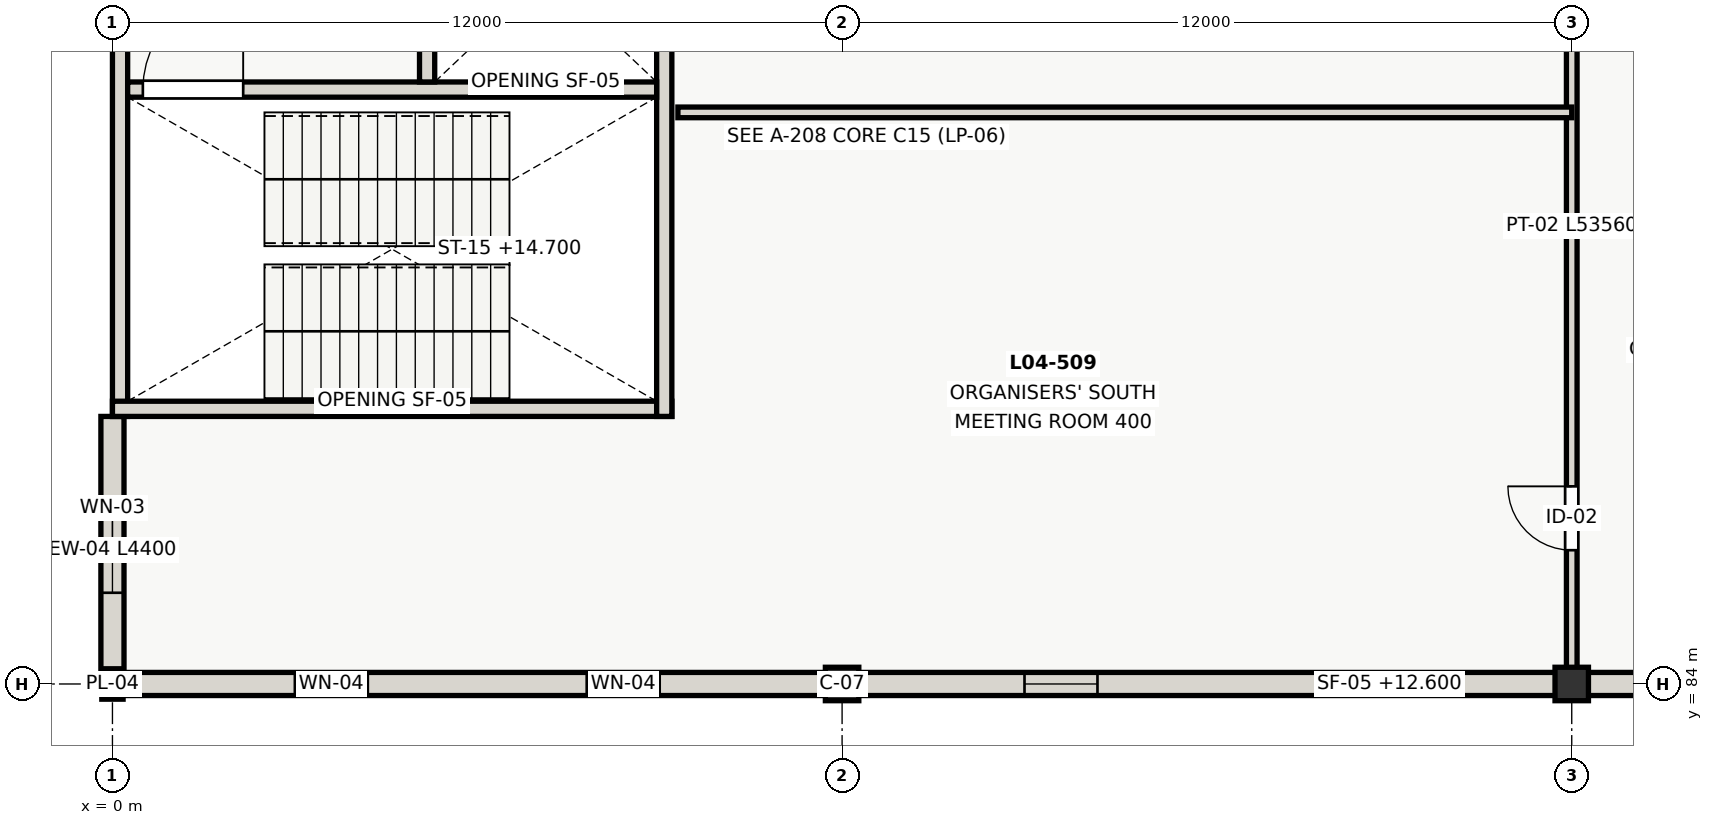
"""IFC4 building model, lengths in metres.
Left out: names, types, materials, properties, quantities, classifications, styles, units other than length and angle.
Written with IfcOpenShell. Run it as: python <this file> out.ifc"""

import sys

from ifc_helpers import new_model, si_unit, direction, frame, frame_2d, origin, origin_2d, place, context, subcontext, project, spatial, rectangle, extrude, element, fill, save


model = new_model("IFC4")
c1 = context("Model", 3, precision=1e-05, world=origin(), true_north=direction((0.0, 1.0)))
c2 = subcontext(c1, "Body", "Model", "MODEL_VIEW")
j1 = project(units=[si_unit("LENGTHUNIT", "METRE"), si_unit("PLANEANGLEUNIT", "RADIAN")], contexts=[c1])
p1 = place(None, origin())
s1 = spatial("IfcSite", under=j1, at=p1, CompositionType="ELEMENT")
p2 = place(p1, origin())
s2 = spatial("IfcBuilding", under=s1, at=p2, CompositionType="ELEMENT")
p3 = place(p2, frame((0.0, 0.0, 12.6)))
s3 = spatial("IfcBuildingStorey", under=s2, at=p3, CompositionType="ELEMENT", Elevation=12.6)
p4 = place(p3, frame((0.0, 84.0, 0.0), z_axis=(0.0, 0.0, 1.0), x_axis=(1.0, 0.0, 0.0)))
e1 = element("IfcColumn", 1, at=p4, inside=s3, PredefinedType="PILASTER", context=c2, shape_type="SweptSolid", body=[
    extrude(rectangle(XDim=0.35, YDim=0.5, at=origin_2d()), origin(), (0.0, 0.0, 1.0), 4.2),
])
for number, where, z_axis, x_axis in (
    (2, (12.0, 84.0, 0.0), (0.0, 0.0, 1.0), (1.0, 0.0, 0.0)),
    (3, (24.0, 84.0, 0.0), (0.0, 0.0, 1.0), (1.0, 0.0, 0.0)),
):
    element("IfcColumn", number, at=place(p3, frame(where, z_axis=z_axis, x_axis=x_axis)), inside=s3, PredefinedType="COLUMN", context=c2, shape_type="SweptSolid", body=[
        extrude(rectangle(XDim=0.55, YDim=0.55, at=origin_2d()), origin(), (0.0, 0.0, 1.0), 4.2),
    ])
p5 = place(p3, frame((0.0, 84.0, 0.0), z_axis=(0.0, 0.0, 1.0), x_axis=(0.0, 1.0, 0.0)))
e4 = element("IfcWall", 4, at=p5, inside=s3, PredefinedType="SOLIDWALL", context=c2, shape_type="SweptSolid", body=[
    extrude(rectangle(XDim=4.4, YDim=0.38, at=frame_2d((2.2, 0.0))), origin(), (0.0, 0.0, 1.0), 3.38),
])
p6 = place(p5, frame((1.5, 0.0, 0.9)))
e5 = element("IfcOpeningElement", 5, at=p6, cuts=e4, PredefinedType="OPENING", context=c2, shape_type="SweptSolid", body=[
    extrude(rectangle(XDim=1.4, YDim=1.95, at=frame_2d((0.7, 0.975))), frame((0.0, 0.2, 0.0), z_axis=(0.0, -1.0, 0.0), x_axis=(1.0, 0.0, 0.0)), (0.0, 0.0, 1.0), 0.4),
])
p7 = place(p3, frame((12.0, 84.0, 0.0), z_axis=(0.0, 0.0, 1.0), x_axis=(-1.0, 0.0, 0.0)))
e6 = element("IfcWall", 6, at=p7, inside=s3, PredefinedType="SOLIDWALL", context=c2, shape_type="SweptSolid", body=[
    extrude(rectangle(XDim=12.0, YDim=0.38, at=frame_2d((6.0, 0.0))), origin(), (0.0, 0.0, 1.0), 3.59),
])
p8 = place(p7, frame((3.0, 0.0, 0.9)))
e7 = element("IfcOpeningElement", 7, at=p8, cuts=e6, PredefinedType="OPENING", context=c2, shape_type="SweptSolid", body=[
    extrude(rectangle(XDim=1.2, YDim=1.9, at=frame_2d((0.6, 0.95))), frame((0.0, 0.2, 0.0), z_axis=(0.0, -1.0, 0.0), x_axis=(1.0, 0.0, 0.0)), (0.0, 0.0, 1.0), 0.4),
])
p9 = place(p7, frame((7.8, 0.0, 0.9)))
e8 = element("IfcOpeningElement", 8, at=p9, cuts=e6, PredefinedType="OPENING", context=c2, shape_type="SweptSolid", body=[
    extrude(rectangle(XDim=1.2, YDim=1.9, at=frame_2d((0.6, 0.95))), frame((0.0, 0.2, 0.0), z_axis=(0.0, -1.0, 0.0), x_axis=(1.0, 0.0, 0.0)), (0.0, 0.0, 1.0), 0.4),
])
p10 = place(p3, frame((24.0, 84.0, 0.0), z_axis=(0.0, 0.0, 1.0), x_axis=(-1.0, 0.0, 0.0)))
e9 = element("IfcWall", 9, at=p10, inside=s3, PredefinedType="SOLIDWALL", context=c2, shape_type="SweptSolid", body=[
    extrude(rectangle(XDim=12.0, YDim=0.38, at=frame_2d((6.0, 0.0))), origin(), (0.0, 0.0, 1.0), 3.59),
])
p11 = place(p10, frame((3.0, 0.0, 0.9)))
e10 = element("IfcOpeningElement", 10, at=p11, cuts=e9, PredefinedType="OPENING", context=c2, shape_type="SweptSolid", body=[
    extrude(rectangle(XDim=1.2, YDim=1.9, at=frame_2d((0.6, 0.95))), frame((0.0, 0.2, 0.0), z_axis=(0.0, -1.0, 0.0), x_axis=(1.0, 0.0, 0.0)), (0.0, 0.0, 1.0), 0.4),
])
p12 = place(p10, frame((7.8, 0.0, 0.9)))
e11 = element("IfcOpeningElement", 11, at=p12, cuts=e9, PredefinedType="OPENING", context=c2, shape_type="SweptSolid", body=[
    extrude(rectangle(XDim=1.2, YDim=1.9, at=frame_2d((0.6, 0.95))), frame((0.0, 0.2, 0.0), z_axis=(0.0, -1.0, 0.0), x_axis=(1.0, 0.0, 0.0)), (0.0, 0.0, 1.0), 0.4),
])
p13 = place(p3, frame((36.0, 84.0, 0.0), z_axis=(0.0, 0.0, 1.0), x_axis=(-1.0, 0.0, 0.0)))
e12 = element("IfcWall", 12, at=p13, inside=s3, PredefinedType="SOLIDWALL", context=c2, shape_type="SweptSolid", body=[
    extrude(rectangle(XDim=12.0, YDim=0.38, at=frame_2d((6.0, 0.0))), origin(), (0.0, 0.0, 1.0), 3.59),
])
p14 = place(p13, frame((3.0, 0.0, 0.9)))
e13 = element("IfcOpeningElement", 13, at=p14, cuts=e12, PredefinedType="OPENING", context=c2, shape_type="SweptSolid", body=[
    extrude(rectangle(XDim=1.2, YDim=1.9, at=frame_2d((0.6, 0.95))), frame((0.0, 0.2, 0.0), z_axis=(0.0, -1.0, 0.0), x_axis=(1.0, 0.0, 0.0)), (0.0, 0.0, 1.0), 0.4),
])
p15 = place(p13, frame((7.8, 0.0, 0.9)))
e14 = element("IfcOpeningElement", 14, at=p15, cuts=e12, PredefinedType="OPENING", context=c2, shape_type="SweptSolid", body=[
    extrude(rectangle(XDim=1.2, YDim=1.9, at=frame_2d((0.6, 0.95))), frame((0.0, 0.2, 0.0), z_axis=(0.0, -1.0, 0.0), x_axis=(1.0, 0.0, 0.0)), (0.0, 0.0, 1.0), 0.4),
])
p16 = place(p3, frame((0.125, 88.4, 0.0), z_axis=(0.0, 0.0, 1.0), x_axis=(0.0, 1.0, 0.0)))
e15 = element("IfcWall", 15, at=p16, inside=s3, PredefinedType="SHEAR", context=c2, shape_type="SweptSolid", body=[
    extrude(rectangle(XDim=9.2, YDim=0.25, at=frame_2d((4.6, 0.0))), origin(), (0.0, 0.0, 1.0), 4.2),
])
p17 = place(p3, frame((0.0, 88.525, 0.0), z_axis=(0.0, 0.0, 1.0), x_axis=(1.0, 0.0, 0.0)))
e16 = element("IfcWall", 16, at=p17, inside=s3, PredefinedType="SHEAR", context=c2, shape_type="SweptSolid", body=[
    extrude(rectangle(XDim=9.2, YDim=0.25, at=frame_2d((4.6, 0.0))), origin(), (0.0, 0.0, 1.0), 4.2),
])
p18 = place(p3, frame((9.075, 88.4, 0.0), z_axis=(0.0, 0.0, 1.0), x_axis=(0.0, 1.0, 0.0)))
e17 = element("IfcWall", 17, at=p18, inside=s3, PredefinedType="SHEAR", context=c2, shape_type="SweptSolid", body=[
    extrude(rectangle(XDim=9.2, YDim=0.25, at=frame_2d((4.6, 0.0))), origin(), (0.0, 0.0, 1.0), 4.2),
])
p19 = place(p3, frame((0.25, 93.775, 0.0), z_axis=(0.0, 0.0, 1.0), x_axis=(1.0, 0.0, 0.0)))
e18 = element("IfcWall", 18, at=p19, inside=s3, PredefinedType="SHEAR", context=c2, shape_type="SweptSolid", body=[
    extrude(rectangle(XDim=8.7, YDim=0.25, at=frame_2d((4.35, 0.0))), origin(), (0.0, 0.0, 1.0), 4.2),
])
p20 = place(p19, frame((0.25, 0.0, 0.0)))
e19 = element("IfcOpeningElement", 19, at=p20, cuts=e18, PredefinedType="OPENING", context=c2, shape_type="SweptSolid", body=[
    extrude(rectangle(XDim=1.65, YDim=2.1, at=frame_2d((0.825, 1.05))), frame((0.0, 0.135, 0.0), z_axis=(0.0, -1.0, 0.0), x_axis=(1.0, 0.0, 0.0)), (0.0, 0.0, 1.0), 0.27),
])
p21 = place(p3, frame((5.175, 93.9, 0.0), z_axis=(0.0, 0.0, 1.0), x_axis=(0.0, 1.0, 0.0)))
e20 = element("IfcWall", 20, at=p21, inside=s3, PredefinedType="SHEAR", context=c2, shape_type="SweptSolid", body=[
    extrude(rectangle(XDim=3.45, YDim=0.25, at=frame_2d((1.725, 0.0))), origin(), (0.0, 0.0, 1.0), 4.2),
])
p22 = place(p21, frame((1.175, 0.0, 0.0)))
e21 = element("IfcOpeningElement", 21, at=p22, cuts=e20, PredefinedType="OPENING", context=c2, shape_type="SweptSolid", body=[
    extrude(rectangle(XDim=1.1, YDim=2.1, at=frame_2d((0.55, 1.05))), frame((0.0, 0.135, 0.0), z_axis=(0.0, -1.0, 0.0), x_axis=(1.0, 0.0, 0.0)), (0.0, 0.0, 1.0), 0.27),
])
p23 = place(p3, frame((24.0, 84.22, 0.0), z_axis=(0.0, 0.0, 1.0), x_axis=(0.0, 1.0, 0.0)))
e22 = element("IfcWall", 22, at=p23, inside=s3, PredefinedType="PARTITIONING", context=c2, shape_type="SweptSolid", body=[
    extrude(rectangle(XDim=53.56, YDim=0.175, at=frame_2d((26.78, 0.0))), origin(), (0.0, 0.0, 1.0), 3.28),
])
p24 = place(p23, frame((1.98, 0.0, 0.0)))
e23 = element("IfcOpeningElement", 23, at=p24, cuts=e22, PredefinedType="OPENING", context=c2, shape_type="SweptSolid", body=[
    extrude(rectangle(XDim=1.05, YDim=2.1, at=frame_2d((0.525, 1.05))), frame((0.0, 0.097, 0.0), z_axis=(0.0, -1.0, 0.0), x_axis=(1.0, 0.0, 0.0)), (0.0, 0.0, 1.0), 0.195),
])
p25 = place(p23, frame((10.28, 0.0, 0.0)))
e24 = element("IfcOpeningElement", 24, at=p25, cuts=e22, PredefinedType="OPENING", context=c2, shape_type="SweptSolid", body=[
    extrude(rectangle(XDim=1.8, YDim=2.15, at=frame_2d((0.9, 1.075))), frame((0.0, 0.097, 0.0), z_axis=(0.0, -1.0, 0.0), x_axis=(1.0, 0.0, 0.0)), (0.0, 0.0, 1.0), 0.195),
])
p26 = place(p23, frame((14.58, 0.0, 0.0)))
e25 = element("IfcOpeningElement", 25, at=p26, cuts=e22, PredefinedType="OPENING", context=c2, shape_type="SweptSolid", body=[
    extrude(rectangle(XDim=1.05, YDim=2.1, at=frame_2d((0.525, 1.05))), frame((0.0, 0.097, 0.0), z_axis=(0.0, -1.0, 0.0), x_axis=(1.0, 0.0, 0.0)), (0.0, 0.0, 1.0), 0.195),
])
p27 = place(p23, frame((25.78, 0.0, 0.0)))
e26 = element("IfcOpeningElement", 26, at=p27, cuts=e22, PredefinedType="OPENING", context=c2, shape_type="SweptSolid", body=[
    extrude(rectangle(XDim=1.05, YDim=2.1, at=frame_2d((0.525, 1.05))), frame((0.0, 0.097, 0.0), z_axis=(0.0, -1.0, 0.0), x_axis=(1.0, 0.0, 0.0)), (0.0, 0.0, 1.0), 0.195),
])
p28 = place(p23, frame((37.98, 0.0, 0.0)))
e27 = element("IfcOpeningElement", 27, at=p28, cuts=e22, PredefinedType="OPENING", context=c2, shape_type="SweptSolid", body=[
    extrude(rectangle(XDim=1.0, YDim=2.1, at=frame_2d((0.5, 1.05))), frame((0.0, 0.097, 0.0), z_axis=(0.0, -1.0, 0.0), x_axis=(1.0, 0.0, 0.0)), (0.0, 0.0, 1.0), 0.195),
])
p29 = place(p23, frame((47.28, 0.0, 0.0)))
e28 = element("IfcOpeningElement", 28, at=p29, cuts=e22, PredefinedType="OPENING", context=c2, shape_type="SweptSolid", body=[
    extrude(rectangle(XDim=0.98, YDim=2.1, at=frame_2d((0.49, 1.05))), frame((0.0, 0.097, 0.0), z_axis=(0.0, -1.0, 0.0), x_axis=(1.0, 0.0, 0.0)), (0.0, 0.0, 1.0), 0.195),
])
p30 = place(p3, frame((9.3, 93.4, 0.0), z_axis=(0.0, 0.0, 1.0), x_axis=(1.0, 0.0, 0.0)))
e29 = element("IfcWall", 29, at=p30, inside=s3, PredefinedType="PARTITIONING", context=c2, shape_type="SweptSolid", body=[
    extrude(rectangle(XDim=14.7, YDim=0.175, at=frame_2d((7.35, 0.0))), origin(), (0.0, 0.0, 1.0), 3.78),
])
p31 = place(p6, origin())
e30 = element("IfcWindow", 30, at=p31, inside=s3, PartitioningType="SINGLE_PANEL", PredefinedType="WINDOW", context=c2, shape_type="SweptSolid", body=[
    extrude(rectangle(XDim=1.4, YDim=1.95, at=frame_2d((0.7, 0.975))), frame((0.0, 0.03, 0.0), z_axis=(0.0, -1.0, 0.0), x_axis=(1.0, 0.0, 0.0)), (0.0, 0.0, 1.0), 0.06),
])
fill(e5, e30)
p32 = place(p8, origin())
e31 = element("IfcWindow", 31, at=p32, inside=s3, PartitioningType="SINGLE_PANEL", PredefinedType="WINDOW", context=c2, shape_type="SweptSolid", body=[
    extrude(rectangle(XDim=1.2, YDim=1.9, at=frame_2d((0.6, 0.95))), frame((0.0, 0.03, 0.0), z_axis=(0.0, -1.0, 0.0), x_axis=(1.0, 0.0, 0.0)), (0.0, 0.0, 1.0), 0.06),
])
fill(e7, e31)
p33 = place(p9, origin())
e32 = element("IfcWindow", 32, at=p33, inside=s3, PartitioningType="SINGLE_PANEL", PredefinedType="WINDOW", context=c2, shape_type="SweptSolid", body=[
    extrude(rectangle(XDim=1.2, YDim=1.9, at=frame_2d((0.6, 0.95))), frame((0.0, 0.03, 0.0), z_axis=(0.0, -1.0, 0.0), x_axis=(1.0, 0.0, 0.0)), (0.0, 0.0, 1.0), 0.06),
])
fill(e8, e32)
p34 = place(p11, origin())
e33 = element("IfcWindow", 33, at=p34, inside=s3, PartitioningType="SINGLE_PANEL", PredefinedType="WINDOW", context=c2, shape_type="SweptSolid", body=[
    extrude(rectangle(XDim=1.2, YDim=1.9, at=frame_2d((0.6, 0.95))), frame((0.0, 0.03, 0.0), z_axis=(0.0, -1.0, 0.0), x_axis=(1.0, 0.0, 0.0)), (0.0, 0.0, 1.0), 0.06),
])
fill(e10, e33)
p35 = place(p12, origin())
e34 = element("IfcWindow", 34, at=p35, inside=s3, PartitioningType="SINGLE_PANEL", PredefinedType="WINDOW", context=c2, shape_type="SweptSolid", body=[
    extrude(rectangle(XDim=1.2, YDim=1.9, at=frame_2d((0.6, 0.95))), frame((0.0, 0.03, 0.0), z_axis=(0.0, -1.0, 0.0), x_axis=(1.0, 0.0, 0.0)), (0.0, 0.0, 1.0), 0.06),
])
fill(e11, e34)
p36 = place(p20, origin())
e35 = element("IfcDoor", 35, at=p36, inside=s3, OperationType="SINGLE_SWING_RIGHT", PredefinedType="DOOR", context=c2, shape_type="SweptSolid", body=[
    extrude(rectangle(XDim=1.65, YDim=2.1, at=frame_2d((0.825, 1.05))), frame((0.0, 0.025, 0.0), z_axis=(0.0, -1.0, 0.0), x_axis=(1.0, 0.0, 0.0)), (0.0, 0.0, 1.0), 0.05),
])
fill(e19, e35)
p37 = place(p24, origin())
e36 = element("IfcDoor", 36, at=p37, inside=s3, OperationType="SINGLE_SWING_RIGHT", PredefinedType="DOOR", context=c2, shape_type="SweptSolid", body=[
    extrude(rectangle(XDim=1.05, YDim=2.1, at=frame_2d((0.525, 1.05))), frame((0.0, 0.025, 0.0), z_axis=(0.0, -1.0, 0.0), x_axis=(1.0, 0.0, 0.0)), (0.0, 0.0, 1.0), 0.05),
])
fill(e23, e36)
save(model, sys.argv[1])
